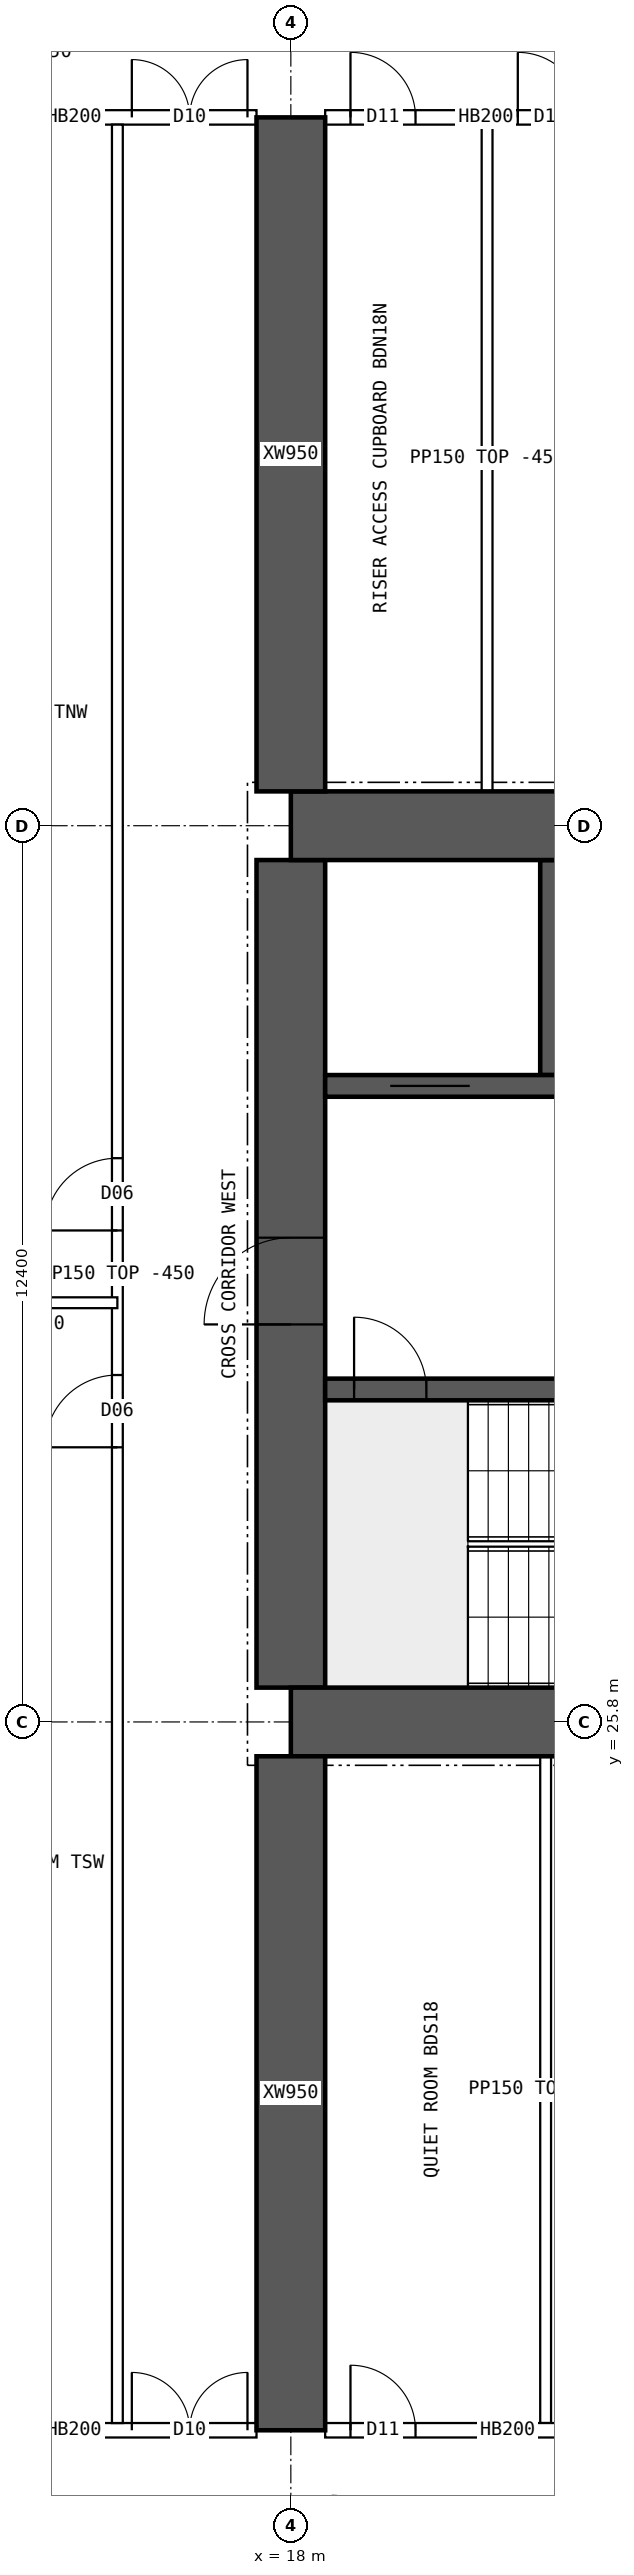
"""IFC4 building model, lengths in metres.
Left out: names, types, materials, properties, quantities, classifications, styles, units other than length and angle.
Written with IfcOpenShell. Run it as: python <this file> out.ifc"""

import sys

from ifc_helpers import new_model, si_unit, direction, frame, frame_2d, origin, place, context, subcontext, project, spatial, rectangle, extrude, element, fill, save


model = new_model("IFC4")
c1 = context("Model", 3, precision=1e-05, world=origin(), true_north=direction((0.0, 1.0)))
c2 = subcontext(c1, "Body", "Model", "MODEL_VIEW")
j1 = project(units=[si_unit("LENGTHUNIT", "METRE"), si_unit("PLANEANGLEUNIT", "RADIAN")], contexts=[c1])
p1 = place(None, origin())
s1 = spatial("IfcSite", under=j1, at=p1, CompositionType="ELEMENT")
p2 = place(p1, origin())
s2 = spatial("IfcBuilding", under=s1, at=p2, CompositionType="ELEMENT")
p3 = place(p2, frame((0.0, 0.0, 95.65)))
s3 = spatial("IfcBuildingStorey", under=s2, at=p3, CompositionType="ELEMENT", Elevation=95.65)
for number, where, z_axis, x_axis in (
    (1, (18.0, 25.8, 0.0), (0.0, 0.0, 1.0), (1.0, 0.0, 0.0)),
    (2, (18.0, 38.2, 0.0), (0.0, 0.0, 1.0), (1.0, 0.0, 0.0)),
):
    element("IfcWall", number, at=place(p3, frame(where, z_axis=z_axis, x_axis=x_axis)), inside=s3, PredefinedType="SHEAR", context=c2, shape_type="SweptSolid", body=[
        extrude(rectangle(XDim=48.0, YDim=0.95, at=frame_2d((24.0, 0.0))), origin(), (0.0, 0.0, 1.0), 3.75),
    ])
p4 = place(p3, frame((18.0, 26.275, 0.0), z_axis=(0.0, 0.0, 1.0), x_axis=(0.0, 1.0, 0.0)))
e3 = element("IfcWall", 3, at=p4, inside=s3, PredefinedType="SHEAR", context=c2, shape_type="SweptSolid", body=[
    extrude(rectangle(XDim=11.45, YDim=0.95, at=frame_2d((5.725, 0.0))), origin(), (0.0, 0.0, 1.0), 3.75),
])
p5 = place(p4, frame((5.025, 0.0, 0.0)))
e4 = element("IfcOpeningElement", 4, at=p5, cuts=e3, PredefinedType="OPENING", context=c2, shape_type="SweptSolid", body=[
    extrude(rectangle(XDim=1.2, YDim=2.1, at=frame_2d((0.6, 1.05))), frame((0.0, 0.485, 0.0), z_axis=(0.0, -1.0, 0.0), x_axis=(1.0, 0.0, 0.0)), (0.0, 0.0, 1.0), 0.97),
])
p6 = place(p3, frame((18.475, 30.4, 0.0), z_axis=(0.0, 0.0, 1.0), x_axis=(1.0, 0.0, 0.0)))
e5 = element("IfcWall", 5, at=p6, inside=s3, PredefinedType="SHEAR", context=c2, shape_type="SweptSolid", body=[
    extrude(rectangle(XDim=47.05, YDim=0.3, at=frame_2d((23.525, 0.0))), origin(), (0.0, 0.0, 1.0), 3.75),
])
p7 = place(p6, frame((0.4, 0.0, 0.0)))
e6 = element("IfcOpeningElement", 6, at=p7, cuts=e5, PredefinedType="OPENING", context=c2, shape_type="SweptSolid", body=[
    extrude(rectangle(XDim=1.0, YDim=2.1, at=frame_2d((0.5, 1.05))), frame((0.0, 0.16, 0.0), z_axis=(0.0, -1.0, 0.0), x_axis=(1.0, 0.0, 0.0)), (0.0, 0.0, 1.0), 0.32),
])
p8 = place(p6, frame((45.65, 0.0, 0.0)))
e7 = element("IfcOpeningElement", 7, at=p8, cuts=e5, PredefinedType="OPENING", context=c2, shape_type="SweptSolid", body=[
    extrude(rectangle(XDim=1.0, YDim=2.1, at=frame_2d((0.5, 1.05))), frame((0.0, 0.16, 0.0), z_axis=(0.0, -1.0, 0.0), x_axis=(1.0, 0.0, 0.0)), (0.0, 0.0, 1.0), 0.32),
])
p9 = place(p6, frame((8.275, 0.0, 0.0)))
e8 = element("IfcOpeningElement", 8, at=p9, cuts=e5, PredefinedType="OPENING", context=c2, shape_type="SweptSolid", body=[
    extrude(rectangle(XDim=1.1, YDim=2.1, at=frame_2d((0.55, 1.05))), frame((0.0, 0.16, 0.0), z_axis=(0.0, -1.0, 0.0), x_axis=(1.0, 0.0, 0.0)), (0.0, 0.0, 1.0), 0.32),
])
p10 = place(p6, frame((10.875, 0.0, 0.0)))
e9 = element("IfcOpeningElement", 9, at=p10, cuts=e5, PredefinedType="OPENING", context=c2, shape_type="SweptSolid", body=[
    extrude(rectangle(XDim=1.1, YDim=2.1, at=frame_2d((0.55, 1.05))), frame((0.0, 0.16, 0.0), z_axis=(0.0, -1.0, 0.0), x_axis=(1.0, 0.0, 0.0)), (0.0, 0.0, 1.0), 0.32),
])
p11 = place(p6, frame((13.475, 0.0, 0.0)))
e10 = element("IfcOpeningElement", 10, at=p11, cuts=e5, PredefinedType="OPENING", context=c2, shape_type="SweptSolid", body=[
    extrude(rectangle(XDim=1.1, YDim=2.1, at=frame_2d((0.55, 1.05))), frame((0.0, 0.16, 0.0), z_axis=(0.0, -1.0, 0.0), x_axis=(1.0, 0.0, 0.0)), (0.0, 0.0, 1.0), 0.32),
])
p12 = place(p6, frame((16.075, 0.0, 0.0)))
e11 = element("IfcOpeningElement", 11, at=p12, cuts=e5, PredefinedType="OPENING", context=c2, shape_type="SweptSolid", body=[
    extrude(rectangle(XDim=1.1, YDim=2.1, at=frame_2d((0.55, 1.05))), frame((0.0, 0.16, 0.0), z_axis=(0.0, -1.0, 0.0), x_axis=(1.0, 0.0, 0.0)), (0.0, 0.0, 1.0), 0.32),
])
p13 = place(p6, frame((18.85, 0.0, 0.0)))
e12 = element("IfcOpeningElement", 12, at=p13, cuts=e5, PredefinedType="OPENING", context=c2, shape_type="SweptSolid", body=[
    extrude(rectangle(XDim=0.9, YDim=2.1, at=frame_2d((0.45, 1.05))), frame((0.0, 0.16, 0.0), z_axis=(0.0, -1.0, 0.0), x_axis=(1.0, 0.0, 0.0)), (0.0, 0.0, 1.0), 0.32),
])
p14 = place(p6, frame((30.142, 0.0, 0.0)))
e13 = element("IfcOpeningElement", 13, at=p14, cuts=e5, PredefinedType="OPENING", context=c2, shape_type="SweptSolid", body=[
    extrude(rectangle(XDim=1.1, YDim=2.1, at=frame_2d((0.55, 1.05))), frame((0.0, 0.16, 0.0), z_axis=(0.0, -1.0, 0.0), x_axis=(1.0, 0.0, 0.0)), (0.0, 0.0, 1.0), 0.32),
])
p15 = place(p6, frame((33.675, 0.0, 0.0)))
e14 = element("IfcOpeningElement", 14, at=p15, cuts=e5, PredefinedType="OPENING", context=c2, shape_type="SweptSolid", body=[
    extrude(rectangle(XDim=1.1, YDim=2.1, at=frame_2d((0.55, 1.05))), frame((0.0, 0.16, 0.0), z_axis=(0.0, -1.0, 0.0), x_axis=(1.0, 0.0, 0.0)), (0.0, 0.0, 1.0), 0.32),
])
p16 = place(p6, frame((37.208, 0.0, 0.0)))
e15 = element("IfcOpeningElement", 15, at=p16, cuts=e5, PredefinedType="OPENING", context=c2, shape_type="SweptSolid", body=[
    extrude(rectangle(XDim=1.1, YDim=2.1, at=frame_2d((0.55, 1.05))), frame((0.0, 0.16, 0.0), z_axis=(0.0, -1.0, 0.0), x_axis=(1.0, 0.0, 0.0)), (0.0, 0.0, 1.0), 0.32),
])
p17 = place(p3, frame((18.475, 34.6, 0.0), z_axis=(0.0, 0.0, 1.0), x_axis=(1.0, 0.0, 0.0)))
e16 = element("IfcWall", 16, at=p17, inside=s3, PredefinedType="SHEAR", context=c2, shape_type="SweptSolid", body=[
    extrude(rectangle(XDim=47.05, YDim=0.3, at=frame_2d((23.525, 0.0))), origin(), (0.0, 0.0, 1.0), 3.75),
])
p18 = place(p17, frame((0.9, 0.0, 0.0)))
e17 = element("IfcOpeningElement", 17, at=p18, cuts=e16, PredefinedType="OPENING", context=c2, shape_type="SweptSolid", body=[
    extrude(rectangle(XDim=1.1, YDim=2.1, at=frame_2d((0.55, 1.05))), frame((0.0, 0.16, 0.0), z_axis=(0.0, -1.0, 0.0), x_axis=(1.0, 0.0, 0.0)), (0.0, 0.0, 1.0), 0.32),
])
p19 = place(p17, frame((45.05, 0.0, 0.0)))
e18 = element("IfcOpeningElement", 18, at=p19, cuts=e16, PredefinedType="OPENING", context=c2, shape_type="SweptSolid", body=[
    extrude(rectangle(XDim=1.1, YDim=2.1, at=frame_2d((0.55, 1.05))), frame((0.0, 0.16, 0.0), z_axis=(0.0, -1.0, 0.0), x_axis=(1.0, 0.0, 0.0)), (0.0, 0.0, 1.0), 0.32),
])
p20 = place(p17, frame((4.125, 0.0, 0.0)))
e19 = element("IfcOpeningElement", 19, at=p20, cuts=e16, PredefinedType="OPENING", context=c2, shape_type="SweptSolid", body=[
    extrude(rectangle(XDim=0.9, YDim=2.1, at=frame_2d((0.45, 1.05))), frame((0.0, 0.16, 0.0), z_axis=(0.0, -1.0, 0.0), x_axis=(1.0, 0.0, 0.0)), (0.0, 0.0, 1.0), 0.32),
])
p21 = place(p17, frame((42.025, 0.0, 0.0)))
e20 = element("IfcOpeningElement", 20, at=p21, cuts=e16, PredefinedType="OPENING", context=c2, shape_type="SweptSolid", body=[
    extrude(rectangle(XDim=0.9, YDim=2.1, at=frame_2d((0.45, 1.05))), frame((0.0, 0.16, 0.0), z_axis=(0.0, -1.0, 0.0), x_axis=(1.0, 0.0, 0.0)), (0.0, 0.0, 1.0), 0.32),
])
p22 = place(p17, frame((8.9, 0.0, 0.0)))
e21 = element("IfcOpeningElement", 21, at=p22, cuts=e16, PredefinedType="OPENING", context=c2, shape_type="SweptSolid", body=[
    extrude(rectangle(XDim=0.9, YDim=2.1, at=frame_2d((0.45, 1.05))), frame((0.0, 0.16, 0.0), z_axis=(0.0, -1.0, 0.0), x_axis=(1.0, 0.0, 0.0)), (0.0, 0.0, 1.0), 0.32),
])
p23 = place(p17, frame((12.874, 0.0, 0.0)))
e22 = element("IfcOpeningElement", 22, at=p23, cuts=e16, PredefinedType="OPENING", context=c2, shape_type="SweptSolid", body=[
    extrude(rectangle(XDim=0.9, YDim=2.1, at=frame_2d((0.45, 1.05))), frame((0.0, 0.16, 0.0), z_axis=(0.0, -1.0, 0.0), x_axis=(1.0, 0.0, 0.0)), (0.0, 0.0, 1.0), 0.32),
])
p24 = place(p17, frame((16.521, 0.0, 0.0)))
e23 = element("IfcOpeningElement", 23, at=p24, cuts=e16, PredefinedType="OPENING", context=c2, shape_type="SweptSolid", body=[
    extrude(rectangle(XDim=0.9, YDim=2.1, at=frame_2d((0.45, 1.05))), frame((0.0, 0.16, 0.0), z_axis=(0.0, -1.0, 0.0), x_axis=(1.0, 0.0, 0.0)), (0.0, 0.0, 1.0), 0.32),
])
p25 = place(p17, frame((20.28, 0.0, 0.0)))
e24 = element("IfcOpeningElement", 24, at=p25, cuts=e16, PredefinedType="OPENING", context=c2, shape_type="SweptSolid", body=[
    extrude(rectangle(XDim=0.9, YDim=2.1, at=frame_2d((0.45, 1.05))), frame((0.0, 0.16, 0.0), z_axis=(0.0, -1.0, 0.0), x_axis=(1.0, 0.0, 0.0)), (0.0, 0.0, 1.0), 0.32),
])
p26 = place(p17, frame((24.686, 0.0, 0.0)))
e25 = element("IfcOpeningElement", 25, at=p26, cuts=e16, PredefinedType="OPENING", context=c2, shape_type="SweptSolid", body=[
    extrude(rectangle(XDim=0.9, YDim=2.1, at=frame_2d((0.45, 1.05))), frame((0.0, 0.16, 0.0), z_axis=(0.0, -1.0, 0.0), x_axis=(1.0, 0.0, 0.0)), (0.0, 0.0, 1.0), 0.32),
])
p27 = place(p17, frame((27.483, 0.0, 0.0)))
e26 = element("IfcOpeningElement", 26, at=p27, cuts=e16, PredefinedType="OPENING", context=c2, shape_type="SweptSolid", body=[
    extrude(rectangle(XDim=0.9, YDim=2.1, at=frame_2d((0.45, 1.05))), frame((0.0, 0.16, 0.0), z_axis=(0.0, -1.0, 0.0), x_axis=(1.0, 0.0, 0.0)), (0.0, 0.0, 1.0), 0.32),
])
p28 = place(p17, frame((30.666, 0.0, 0.0)))
e27 = element("IfcOpeningElement", 27, at=p28, cuts=e16, PredefinedType="OPENING", context=c2, shape_type="SweptSolid", body=[
    extrude(rectangle(XDim=0.9, YDim=2.1, at=frame_2d((0.45, 1.05))), frame((0.0, 0.16, 0.0), z_axis=(0.0, -1.0, 0.0), x_axis=(1.0, 0.0, 0.0)), (0.0, 0.0, 1.0), 0.32),
])
p29 = place(p17, frame((34.617, 0.0, 0.0)))
e28 = element("IfcOpeningElement", 28, at=p29, cuts=e16, PredefinedType="OPENING", context=c2, shape_type="SweptSolid", body=[
    extrude(rectangle(XDim=0.9, YDim=2.1, at=frame_2d((0.45, 1.05))), frame((0.0, 0.16, 0.0), z_axis=(0.0, -1.0, 0.0), x_axis=(1.0, 0.0, 0.0)), (0.0, 0.0, 1.0), 0.32),
])
p30 = place(p17, frame((37.555, 0.0, 0.0)))
e29 = element("IfcOpeningElement", 29, at=p30, cuts=e16, PredefinedType="OPENING", context=c2, shape_type="SweptSolid", body=[
    extrude(rectangle(XDim=0.9, YDim=2.1, at=frame_2d((0.45, 1.05))), frame((0.0, 0.16, 0.0), z_axis=(0.0, -1.0, 0.0), x_axis=(1.0, 0.0, 0.0)), (0.0, 0.0, 1.0), 0.32),
])
p31 = place(p3, frame((21.6, 34.75, 0.0), z_axis=(0.0, 0.0, 1.0), x_axis=(0.0, 1.0, 0.0)))
e30 = element("IfcWall", 30, at=p31, inside=s3, PredefinedType="SHEAR", context=c2, shape_type="SweptSolid", body=[
    extrude(rectangle(XDim=2.975, YDim=0.3, at=frame_2d((1.488, 0.0))), origin(), (0.0, 0.0, 1.0), 3.75),
])
for number, where, z_axis, x_axis in (
    (31, (18.0, 16.0, 0.0), (0.0, 0.0, 1.0), (0.0, 1.0, 0.0)),
    (32, (18.0, 38.675, 0.0), (0.0, 0.0, 1.0), (0.0, 1.0, 0.0)),
):
    element("IfcWall", number, at=place(p3, frame(where, z_axis=z_axis, x_axis=x_axis)), inside=s3, PredefinedType="SHEAR", context=c2, shape_type="SweptSolid", body=[
        extrude(rectangle(XDim=9.325, YDim=0.95, at=frame_2d((4.663, 0.0))), origin(), (0.0, 0.0, 1.0), 3.75),
    ])
p32 = place(p3, frame((12.475, 16.0, 0.0), z_axis=(0.0, 0.0, 1.0), x_axis=(1.0, 0.0, 0.0)))
e33 = element("IfcWall", 33, at=p32, inside=s3, PredefinedType="SOLIDWALL", context=c2, shape_type="SweptSolid", body=[
    extrude(rectangle(XDim=5.05, YDim=0.2, at=frame_2d((2.525, 0.0))), origin(), (0.0, 0.0, 1.0), 3.3),
])
p33 = place(p32, frame((3.325, 0.0, 0.0)))
e34 = element("IfcOpeningElement", 34, at=p33, cuts=e33, PredefinedType="OPENING", context=c2, shape_type="SweptSolid", body=[
    extrude(rectangle(XDim=1.6, YDim=2.1, at=frame_2d((0.8, 1.05))), frame((0.0, 0.11, 0.0), z_axis=(0.0, -1.0, 0.0), x_axis=(1.0, 0.0, 0.0)), (0.0, 0.0, 1.0), 0.22),
])
p34 = place(p3, frame((18.475, 16.0, 0.0), z_axis=(0.0, 0.0, 1.0), x_axis=(1.0, 0.0, 0.0)))
e35 = element("IfcWall", 35, at=p34, inside=s3, PredefinedType="SOLIDWALL", context=c2, shape_type="SweptSolid", body=[
    extrude(rectangle(XDim=5.05, YDim=0.2, at=frame_2d((2.525, 0.0))), origin(), (0.0, 0.0, 1.0), 3.3),
])
p35 = place(p34, frame((0.35, 0.0, 0.0)))
e36 = element("IfcOpeningElement", 36, at=p35, cuts=e35, PredefinedType="OPENING", context=c2, shape_type="SweptSolid", body=[
    extrude(rectangle(XDim=0.9, YDim=2.1, at=frame_2d((0.45, 1.05))), frame((0.0, 0.11, 0.0), z_axis=(0.0, -1.0, 0.0), x_axis=(1.0, 0.0, 0.0)), (0.0, 0.0, 1.0), 0.22),
])
p36 = place(p34, frame((3.475, 0.0, 0.0)))
e37 = element("IfcOpeningElement", 37, at=p36, cuts=e35, PredefinedType="OPENING", context=c2, shape_type="SweptSolid", body=[
    extrude(rectangle(XDim=0.9, YDim=2.1, at=frame_2d((0.45, 1.05))), frame((0.0, 0.11, 0.0), z_axis=(0.0, -1.0, 0.0), x_axis=(1.0, 0.0, 0.0)), (0.0, 0.0, 1.0), 0.22),
])
p37 = place(p3, frame((12.475, 48.0, 0.0), z_axis=(0.0, 0.0, 1.0), x_axis=(1.0, 0.0, 0.0)))
e38 = element("IfcWall", 38, at=p37, inside=s3, PredefinedType="SOLIDWALL", context=c2, shape_type="SweptSolid", body=[
    extrude(rectangle(XDim=5.05, YDim=0.2, at=frame_2d((2.525, 0.0))), origin(), (0.0, 0.0, 1.0), 3.3),
])
p38 = place(p37, frame((3.325, 0.0, 0.0)))
e39 = element("IfcOpeningElement", 39, at=p38, cuts=e38, PredefinedType="OPENING", context=c2, shape_type="SweptSolid", body=[
    extrude(rectangle(XDim=1.6, YDim=2.1, at=frame_2d((0.8, 1.05))), frame((0.0, 0.11, 0.0), z_axis=(0.0, -1.0, 0.0), x_axis=(1.0, 0.0, 0.0)), (0.0, 0.0, 1.0), 0.22),
])
p39 = place(p3, frame((18.475, 48.0, 0.0), z_axis=(0.0, 0.0, 1.0), x_axis=(1.0, 0.0, 0.0)))
e40 = element("IfcWall", 40, at=p39, inside=s3, PredefinedType="SOLIDWALL", context=c2, shape_type="SweptSolid", body=[
    extrude(rectangle(XDim=5.05, YDim=0.2, at=frame_2d((2.525, 0.0))), origin(), (0.0, 0.0, 1.0), 3.3),
])
p40 = place(p39, frame((0.35, 0.0, 0.0)))
e41 = element("IfcOpeningElement", 41, at=p40, cuts=e40, PredefinedType="OPENING", context=c2, shape_type="SweptSolid", body=[
    extrude(rectangle(XDim=0.9, YDim=2.1, at=frame_2d((0.45, 1.05))), frame((0.0, 0.11, 0.0), z_axis=(0.0, -1.0, 0.0), x_axis=(1.0, 0.0, 0.0)), (0.0, 0.0, 1.0), 0.22),
])
p41 = place(p39, frame((2.665, 0.0, 0.0)))
e42 = element("IfcOpeningElement", 42, at=p41, cuts=e40, PredefinedType="OPENING", context=c2, shape_type="SweptSolid", body=[
    extrude(rectangle(XDim=0.9, YDim=2.1, at=frame_2d((0.45, 1.05))), frame((0.0, 0.11, 0.0), z_axis=(0.0, -1.0, 0.0), x_axis=(1.0, 0.0, 0.0)), (0.0, 0.0, 1.0), 0.22),
])
for number, where, z_axis, x_axis in (
    (43, (21.525, 16.1, 0.0), (0.0, 0.0, 1.0), (0.0, 1.0, 0.0)),
    (44, (20.715, 38.675, 0.0), (0.0, 0.0, 1.0), (0.0, 1.0, 0.0)),
):
    element("IfcWall", number, at=place(p3, frame(where, z_axis=z_axis, x_axis=x_axis)), inside=s3, PredefinedType="PARTITIONING", context=c2, shape_type="SweptSolid", body=[
        extrude(rectangle(XDim=9.225, YDim=0.15, at=frame_2d((4.612, 0.0))), origin(), (0.0, 0.0, 1.0), 3.3),
    ])
p42 = place(p3, frame((15.6, 16.1, 0.0), z_axis=(0.0, 0.0, 1.0), x_axis=(0.0, 1.0, 0.0)))
e45 = element("IfcWall", 45, at=p42, inside=s3, PredefinedType="PARTITIONING", context=c2, shape_type="SweptSolid", body=[
    extrude(rectangle(XDim=31.8, YDim=0.15, at=frame_2d((15.9, 0.0))), origin(), (0.0, 0.0, 1.0), 3.3),
])
p43 = place(p42, frame((13.5, 0.0, 0.0)))
e46 = element("IfcOpeningElement", 46, at=p43, cuts=e45, PredefinedType="OPENING", context=c2, shape_type="SweptSolid", body=[
    extrude(rectangle(XDim=1.0, YDim=2.1, at=frame_2d((0.5, 1.05))), frame((0.0, 0.085, 0.0), z_axis=(0.0, -1.0, 0.0), x_axis=(1.0, 0.0, 0.0)), (0.0, 0.0, 1.0), 0.17),
])
p44 = place(p42, frame((16.5, 0.0, 0.0)))
e47 = element("IfcOpeningElement", 47, at=p44, cuts=e45, PredefinedType="OPENING", context=c2, shape_type="SweptSolid", body=[
    extrude(rectangle(XDim=1.0, YDim=2.1, at=frame_2d((0.5, 1.05))), frame((0.0, 0.085, 0.0), z_axis=(0.0, -1.0, 0.0), x_axis=(1.0, 0.0, 0.0)), (0.0, 0.0, 1.0), 0.17),
])
p45 = place(p3, frame((12.0, 31.6, 0.0), z_axis=(0.0, 0.0, 1.0), x_axis=(1.0, 0.0, 0.0)))
e48 = element("IfcWall", 48, at=p45, inside=s3, PredefinedType="PARTITIONING", context=c2, shape_type="SweptSolid", body=[
    extrude(rectangle(XDim=3.6, YDim=0.15, at=frame_2d((1.8, 0.0))), origin(), (0.0, 0.0, 1.0), 3.3),
])
p46 = place(p5, origin())
e49 = element("IfcDoor", 49, at=p46, inside=s3, OperationType="SINGLE_SWING_LEFT", PredefinedType="DOOR", context=c2, shape_type="SweptSolid", body=[
    extrude(rectangle(XDim=1.2, YDim=2.1, at=frame_2d((0.6, 1.05))), frame((0.0, 0.025, 0.0), z_axis=(0.0, -1.0, 0.0), x_axis=(1.0, 0.0, 0.0)), (0.0, 0.0, 1.0), 0.05),
])
fill(e4, e49)
p47 = place(p7, origin())
e50 = element("IfcDoor", 50, at=p47, inside=s3, OperationType="SINGLE_SWING_LEFT", PredefinedType="DOOR", context=c2, shape_type="SweptSolid", body=[
    extrude(rectangle(XDim=1.0, YDim=2.1, at=frame_2d((0.5, 1.05))), frame((0.0, 0.025, 0.0), z_axis=(0.0, -1.0, 0.0), x_axis=(1.0, 0.0, 0.0)), (0.0, 0.0, 1.0), 0.05),
])
fill(e6, e50)
p48 = place(p18, origin())
e51 = element("IfcDoor", 51, at=p48, inside=s3, OperationType="DOUBLE_DOOR_SLIDING", PredefinedType="DOOR", context=c2, shape_type="SweptSolid", body=[
    extrude(rectangle(XDim=1.1, YDim=2.1, at=frame_2d((0.55, 1.05))), frame((0.0, 0.025, 0.0), z_axis=(0.0, -1.0, 0.0), x_axis=(1.0, 0.0, 0.0)), (0.0, 0.0, 1.0), 0.05),
])
fill(e17, e51)
p49 = place(p33, origin())
e52 = element("IfcDoor", 52, at=p49, inside=s3, OperationType="DOUBLE_DOOR_SINGLE_SWING", PredefinedType="DOOR", context=c2, shape_type="SweptSolid", body=[
    extrude(rectangle(XDim=1.6, YDim=2.1, at=frame_2d((0.8, 1.05))), frame((0.0, 0.025, 0.0), z_axis=(0.0, -1.0, 0.0), x_axis=(1.0, 0.0, 0.0)), (0.0, 0.0, 1.0), 0.05),
])
fill(e34, e52)
p50 = place(p38, origin())
e53 = element("IfcDoor", 53, at=p50, inside=s3, OperationType="DOUBLE_DOOR_SINGLE_SWING", PredefinedType="DOOR", context=c2, shape_type="SweptSolid", body=[
    extrude(rectangle(XDim=1.6, YDim=2.1, at=frame_2d((0.8, 1.05))), frame((0.0, 0.025, 0.0), z_axis=(0.0, -1.0, 0.0), x_axis=(1.0, 0.0, 0.0)), (0.0, 0.0, 1.0), 0.05),
])
fill(e39, e53)
p51 = place(p35, origin())
e54 = element("IfcDoor", 54, at=p51, inside=s3, OperationType="SINGLE_SWING_LEFT", PredefinedType="DOOR", context=c2, shape_type="SweptSolid", body=[
    extrude(rectangle(XDim=0.9, YDim=2.1, at=frame_2d((0.45, 1.05))), frame((0.0, 0.025, 0.0), z_axis=(0.0, -1.0, 0.0), x_axis=(1.0, 0.0, 0.0)), (0.0, 0.0, 1.0), 0.05),
])
fill(e36, e54)
p52 = place(p40, origin())
e55 = element("IfcDoor", 55, at=p52, inside=s3, OperationType="SINGLE_SWING_LEFT", PredefinedType="DOOR", context=c2, shape_type="SweptSolid", body=[
    extrude(rectangle(XDim=0.9, YDim=2.1, at=frame_2d((0.45, 1.05))), frame((0.0, 0.025, 0.0), z_axis=(0.0, -1.0, 0.0), x_axis=(1.0, 0.0, 0.0)), (0.0, 0.0, 1.0), 0.05),
])
fill(e41, e55)
p53 = place(p41, origin())
e56 = element("IfcDoor", 56, at=p53, inside=s3, OperationType="SINGLE_SWING_LEFT", PredefinedType="DOOR", context=c2, shape_type="SweptSolid", body=[
    extrude(rectangle(XDim=0.9, YDim=2.1, at=frame_2d((0.45, 1.05))), frame((0.0, 0.025, 0.0), z_axis=(0.0, -1.0, 0.0), x_axis=(1.0, 0.0, 0.0)), (0.0, 0.0, 1.0), 0.05),
])
fill(e42, e56)
p54 = place(p43, origin())
e57 = element("IfcDoor", 57, at=p54, inside=s3, OperationType="SINGLE_SWING_LEFT", PredefinedType="DOOR", context=c2, shape_type="SweptSolid", body=[
    extrude(rectangle(XDim=1.0, YDim=2.1, at=frame_2d((0.5, 1.05))), frame((0.0, 0.025, 0.0), z_axis=(0.0, -1.0, 0.0), x_axis=(1.0, 0.0, 0.0)), (0.0, 0.0, 1.0), 0.05),
])
fill(e46, e57)
p55 = place(p44, origin())
e58 = element("IfcDoor", 58, at=p55, inside=s3, OperationType="SINGLE_SWING_LEFT", PredefinedType="DOOR", context=c2, shape_type="SweptSolid", body=[
    extrude(rectangle(XDim=1.0, YDim=2.1, at=frame_2d((0.5, 1.05))), frame((0.0, 0.025, 0.0), z_axis=(0.0, -1.0, 0.0), x_axis=(1.0, 0.0, 0.0)), (0.0, 0.0, 1.0), 0.05),
])
fill(e47, e58)
save(model, sys.argv[1])
